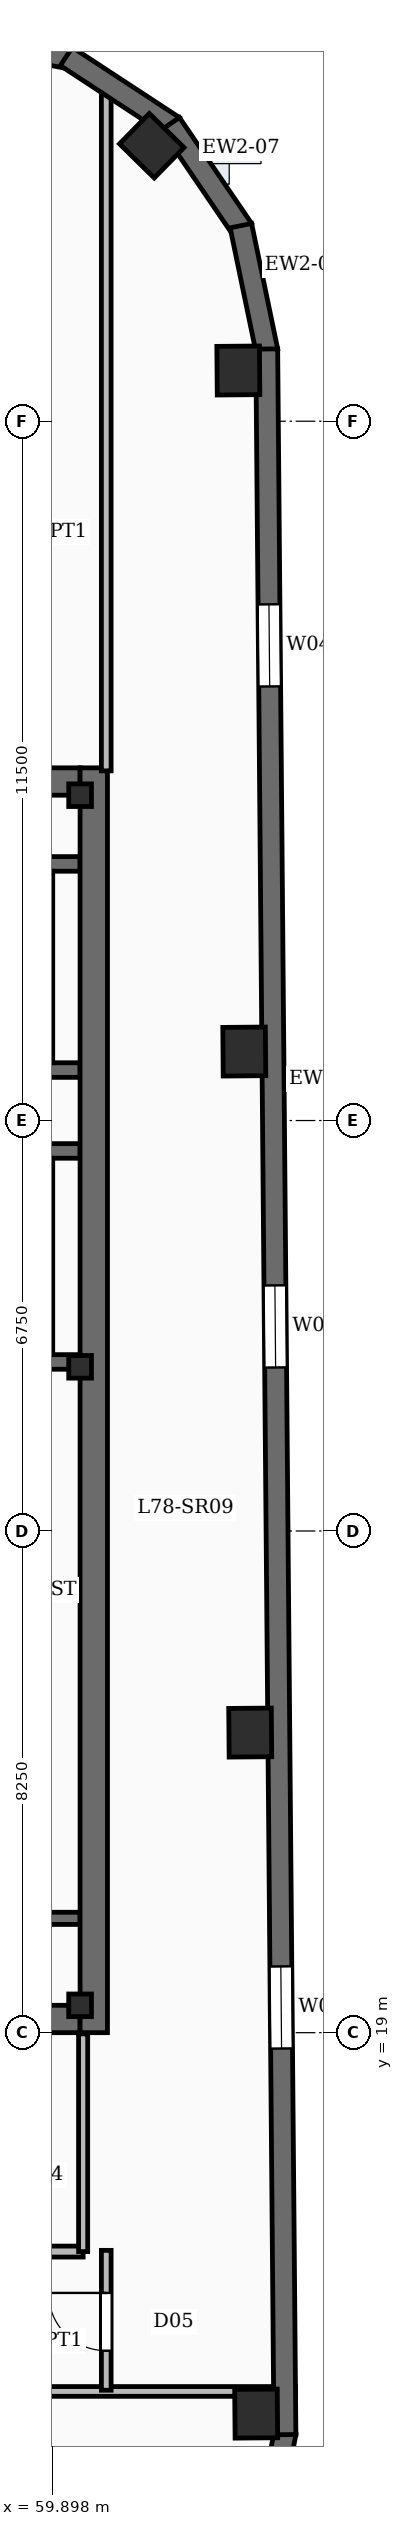
"""IFC4 building model, lengths in metres.
Left out: names, types, materials, properties, quantities, classifications, styles, units other than length and angle.
Written with IfcOpenShell. Run it as: python <this file> out.ifc"""

import sys

from ifc_helpers import new_model, si_unit, direction, frame, frame_2d, origin, origin_2d, place, context, subcontext, project, spatial, rectangle, i_section, extrude, element, fill, save


model = new_model("IFC4")
c1 = context("Model", 3, precision=1e-05, world=origin(), true_north=direction((0.0, 1.0)))
c2 = subcontext(c1, "Body", "Model", "MODEL_VIEW")
j1 = project(units=[si_unit("LENGTHUNIT", "METRE"), si_unit("PLANEANGLEUNIT", "RADIAN")], contexts=[c1])
p1 = place(None, origin())
s1 = spatial("IfcSite", under=j1, at=p1, CompositionType="ELEMENT")
p2 = place(p1, origin())
s2 = spatial("IfcBuilding", under=s1, at=p2, CompositionType="ELEMENT")
p3 = place(p2, frame((0.0, 0.0, 317.2)))
s3 = spatial("IfcBuildingStorey", under=s2, at=p3, CompositionType="ELEMENT", Elevation=317.2)
p4 = place(p3, frame((60.575, 19.0, -0.24), z_axis=(0.0, 0.0, 1.0), x_axis=(0.0, 1.0, 0.0)))
e1 = element("IfcWall", 1, at=p4, inside=s3, PredefinedType="SHEAR", context=c2, shape_type="SweptSolid", body=[
    extrude(rectangle(XDim=20.8, YDim=0.45, at=frame_2d((10.4, 0.0))), origin(), (0.0, 0.0, 1.0), 4.62),
])
for number, where, z_axis, x_axis in (
    (2, (50.55, 19.225, -0.24), (0.0, 0.0, 1.0), (1.0, 0.0, 0.0)),
    (3, (50.55, 39.575, -0.24), (0.0, 0.0, 1.0), (1.0, 0.0, 0.0)),
):
    element("IfcWall", number, at=place(p3, frame(where, z_axis=z_axis, x_axis=x_axis)), inside=s3, PredefinedType="SHEAR", context=c2, shape_type="SweptSolid", body=[
        extrude(rectangle(XDim=9.8, YDim=0.45, at=frame_2d((4.9, 0.0))), origin(), (0.0, 0.0, 1.0), 4.62),
    ])
for number, where, z_axis, x_axis in (
    (4, (60.35, 19.45, -0.24), (0.0, 0.0, 1.0), (1.0, 0.0, 0.0)),
    (5, (60.35, 29.95, -0.24), (0.0, 0.0, 1.0), (1.0, 0.0, 0.0)),
    (6, (60.35, 39.35, -0.24), (0.0, 0.0, 1.0), (1.0, 0.0, 0.0)),
):
    element("IfcColumn", number, at=place(p3, frame(where, z_axis=z_axis, x_axis=x_axis)), inside=s3, PredefinedType="COLUMN", context=c2, shape_type="SweptSolid", body=[
        extrude(i_section(OverallWidth=0.374, OverallDepth=0.372, WebThickness=0.016, FlangeThickness=0.026, FilletRadius=0.02, at=origin_2d()), origin(), (0.0, 0.0, 1.0), 4.62),
    ])
for number, where, z_axis, x_axis in (
    (7, (63.246, 12.735, -0.24), (0.0, 0.0, 1.0), (-0.009, 1.0, 0.0)),
    (8, (63.148, 23.935, -0.24), (0.0, 0.0, 1.0), (-0.009, 1.0, 0.0)),
    (9, (63.05, 35.135, -0.24), (0.0, 0.0, 1.0), (-0.009, 1.0, 0.0)),
    (10, (62.952, 46.334, -0.24), (0.0, 0.0, 1.0), (-0.009, 1.0, 0.0)),
    (11, (61.529, 50.031, -0.24), (0.0, 0.0, 1.0), (-0.713, 0.701, 0.0)),
):
    element("IfcColumn", number, at=place(p3, frame(where, z_axis=z_axis, x_axis=x_axis)), inside=s3, PredefinedType="COLUMN", context=c2, shape_type="SweptSolid", body=[
        extrude(rectangle(XDim=0.8, YDim=0.7, at=origin_2d()), origin(), (0.0, 0.0, 1.0), 4.62),
    ])
p5 = place(p3, frame((63.722, 12.425, 0.0), z_axis=(0.0, 0.0, 1.0), x_axis=(-0.186435855703, -0.98246713518, 0.0)))
e12 = element("IfcWall", 12, at=p5, inside=s3, PredefinedType="SOLIDWALL", context=c2, shape_type="SweptSolid", body=[
    extrude(rectangle(XDim=2.107, YDim=0.36, at=frame_2d((1.053, 0.0))), origin(), (0.0, 0.0, 1.0), 4.38),
])
p6 = place(p3, frame((63.419, 46.688, 0.0), z_axis=(0.0, 0.0, 1.0), x_axis=(0.008726391715, -0.999961924319, 0.0)))
e13 = element("IfcWall", 13, at=p6, inside=s3, PredefinedType="SOLIDWALL", context=c2, shape_type="SweptSolid", body=[
    extrude(rectangle(XDim=34.3, YDim=0.36, at=frame_2d((17.15, 0.0))), origin(), (0.0, 0.0, 1.0), 4.38),
])
p7 = place(p6, frame((4.2, 0.0, 0.88)))
e14 = element("IfcOpeningElement", 14, at=p7, cuts=e13, PredefinedType="OPENING", context=c2, shape_type="SweptSolid", body=[
    extrude(rectangle(XDim=1.35, YDim=2.2, at=frame_2d((0.675, 1.1))), frame((0.0, 0.19, 0.0), z_axis=(0.0, -1.0, 0.0), x_axis=(1.0, 0.0, 0.0)), (0.0, 0.0, 1.0), 0.38),
])
p8 = place(p6, frame((15.4, 0.0, 0.88)))
e15 = element("IfcOpeningElement", 15, at=p8, cuts=e13, PredefinedType="OPENING", context=c2, shape_type="SweptSolid", body=[
    extrude(rectangle(XDim=1.35, YDim=2.2, at=frame_2d((0.675, 1.1))), frame((0.0, 0.19, 0.0), z_axis=(0.0, -1.0, 0.0), x_axis=(1.0, 0.0, 0.0)), (0.0, 0.0, 1.0), 0.38),
])
p9 = place(p6, frame((26.6, 0.0, 0.88)))
e16 = element("IfcOpeningElement", 16, at=p9, cuts=e13, PredefinedType="OPENING", context=c2, shape_type="SweptSolid", body=[
    extrude(rectangle(XDim=1.35, YDim=2.2, at=frame_2d((0.675, 1.1))), frame((0.0, 0.19, 0.0), z_axis=(0.0, -1.0, 0.0), x_axis=(1.0, 0.0, 0.0)), (0.0, 0.0, 1.0), 0.38),
])
for number, where, z_axis, x_axis in (
    (17, (62.994, 48.716, 0.0), (0.0, 0.0, 1.0), (0.204, -0.979, 0.0)),
    (18, (61.836, 50.393, 0.0), (0.0, 0.0, 1.0), (0.563, -0.827, 0.0)),
):
    element("IfcWall", number, at=place(p3, frame(where, z_axis=z_axis, x_axis=x_axis)), inside=s3, PredefinedType="SOLIDWALL", context=c2, shape_type="SweptSolid", body=[
        extrude(rectangle(XDim=2.107, YDim=0.36, at=frame_2d((1.053, 0.0))), origin(), (0.0, 0.0, 1.0), 4.38),
    ])
for number, where, z_axis, x_axis in (
    (19, (60.124, 51.499, 0.0), (0.0, 0.0, 1.0), (0.836, -0.548, 0.0)),
    (20, (58.119, 51.865, 0.0), (0.0, 0.0, 1.0), (0.982, -0.186, 0.0)),
):
    element("IfcWall", number, at=place(p3, frame(where, z_axis=z_axis, x_axis=x_axis)), inside=s3, PredefinedType="SOLIDWALL", context=c2, shape_type="SweptSolid", body=[
        extrude(rectangle(XDim=2.107, YDim=0.36, at=frame_2d((1.053, 0.0))), origin(), (0.0, 0.0, 1.0), 4.38),
    ])
p10 = place(p3, frame((60.35, 30.03, 0.0), z_axis=(0.0, 0.0, 1.0), x_axis=(-1.0, 0.0, 0.0)))
e21 = element("IfcWall", 21, at=p10, inside=s3, PredefinedType="SOLIDWALL", context=c2, shape_type="SweptSolid", body=[
    extrude(rectangle(XDim=9.8, YDim=0.24, at=frame_2d((4.9, 0.0))), origin(), (0.0, 0.0, 1.0), 4.38),
])
p11 = place(p10, frame((7.83, 0.0, 0.0)))
e22 = element("IfcOpeningElement", 22, at=p11, cuts=e21, PredefinedType="OPENING", context=c2, shape_type="SweptSolid", body=[
    extrude(rectangle(XDim=1.1, YDim=2.15, at=frame_2d((0.55, 1.075))), frame((0.0, 0.13, 0.0), z_axis=(0.0, -1.0, 0.0), x_axis=(1.0, 0.0, 0.0)), (0.0, 0.0, 1.0), 0.26),
])
p12 = place(p3, frame((50.55, 33.5, 0.0), z_axis=(0.0, 0.0, 1.0), x_axis=(1.0, 0.0, 0.0)))
e23 = element("IfcWall", 23, at=p12, inside=s3, PredefinedType="SOLIDWALL", context=c2, shape_type="SweptSolid", body=[
    extrude(rectangle(XDim=9.8, YDim=0.24, at=frame_2d((4.9, 0.0))), origin(), (0.0, 0.0, 1.0), 4.38),
])
p13 = place(p3, frame((59.78, 30.15, 0.0), z_axis=(0.0, 0.0, 1.0), x_axis=(0.0, 1.0, 0.0)))
e24 = element("IfcWall", 24, at=p13, inside=s3, PredefinedType="SOLIDWALL", context=c2, shape_type="SweptSolid", body=[
    extrude(rectangle(XDim=3.23, YDim=0.24, at=frame_2d((1.615, 0.0))), origin(), (0.0, 0.0, 1.0), 4.38),
])
p14 = place(p3, frame((60.35, 34.83, 0.0), z_axis=(0.0, 0.0, 1.0), x_axis=(-1.0, 0.0, 0.0)))
e25 = element("IfcWall", 25, at=p14, inside=s3, PredefinedType="SOLIDWALL", context=c2, shape_type="SweptSolid", body=[
    extrude(rectangle(XDim=9.8, YDim=0.24, at=frame_2d((4.9, 0.0))), origin(), (0.0, 0.0, 1.0), 4.38),
])
p15 = place(p14, frame((7.87, 0.0, 0.0)))
e26 = element("IfcOpeningElement", 26, at=p15, cuts=e25, PredefinedType="OPENING", context=c2, shape_type="SweptSolid", body=[
    extrude(rectangle(XDim=1.1, YDim=2.15, at=frame_2d((0.55, 1.075))), frame((0.0, 0.13, 0.0), z_axis=(0.0, -1.0, 0.0), x_axis=(1.0, 0.0, 0.0)), (0.0, 0.0, 1.0), 0.26),
])
p16 = place(p3, frame((50.55, 38.22, 0.0), z_axis=(0.0, 0.0, 1.0), x_axis=(1.0, 0.0, 0.0)))
e27 = element("IfcWall", 27, at=p16, inside=s3, PredefinedType="SOLIDWALL", context=c2, shape_type="SweptSolid", body=[
    extrude(rectangle(XDim=9.8, YDim=0.24, at=frame_2d((4.9, 0.0))), origin(), (0.0, 0.0, 1.0), 4.38),
])
p17 = place(p3, frame((59.78, 34.95, 0.0), z_axis=(0.0, 0.0, 1.0), x_axis=(0.0, 1.0, 0.0)))
e28 = element("IfcWall", 28, at=p17, inside=s3, PredefinedType="SOLIDWALL", context=c2, shape_type="SweptSolid", body=[
    extrude(rectangle(XDim=3.15, YDim=0.24, at=frame_2d((1.575, 0.0))), origin(), (0.0, 0.0, 1.0), 4.38),
])
p18 = place(p3, frame((50.55, 20.88, 0.0), z_axis=(0.0, 0.0, 1.0), x_axis=(1.0, 0.0, 0.0)))
e29 = element("IfcWall", 29, at=p18, inside=s3, PredefinedType="SOLIDWALL", context=c2, shape_type="SweptSolid", body=[
    extrude(rectangle(XDim=9.8, YDim=0.2, at=frame_2d((4.9, 0.0))), origin(), (0.0, 0.0, 1.0), 3.44),
])
p19 = place(p18, frame((1.4, 0.0, 0.0)))
e30 = element("IfcOpeningElement", 30, at=p19, cuts=e29, PredefinedType="OPENING", context=c2, shape_type="SweptSolid", body=[
    extrude(rectangle(XDim=1.05, YDim=2.15, at=frame_2d((0.525, 1.075))), frame((0.0, 0.11, 0.0), z_axis=(0.0, -1.0, 0.0), x_axis=(1.0, 0.0, 0.0)), (0.0, 0.0, 1.0), 0.22),
])
p20 = place(p18, frame((5.5, 0.0, 0.0)))
e31 = element("IfcOpeningElement", 31, at=p20, cuts=e29, PredefinedType="OPENING", context=c2, shape_type="SweptSolid", body=[
    extrude(rectangle(XDim=1.05, YDim=2.15, at=frame_2d((0.525, 1.075))), frame((0.0, 0.11, 0.0), z_axis=(0.0, -1.0, 0.0), x_axis=(1.0, 0.0, 0.0)), (0.0, 0.0, 1.0), 0.22),
])
p21 = place(p3, frame((50.4, 15.4, 0.0), z_axis=(0.0, 0.0, 1.0), x_axis=(1.0, 0.0, 0.0)))
e32 = element("IfcWall", 32, at=p21, inside=s3, PredefinedType="SOLIDWALL", context=c2, shape_type="SweptSolid", body=[
    extrude(rectangle(XDim=10.0, YDim=0.18, at=frame_2d((5.0, 0.0))), origin(), (0.0, 0.0, 1.0), 3.44),
])
p22 = place(p21, frame((1.19, 0.0, 0.0)))
e33 = element("IfcOpeningElement", 33, at=p22, cuts=e32, PredefinedType="OPENING", context=c2, shape_type="SweptSolid", body=[
    extrude(rectangle(XDim=0.92, YDim=2.1, at=frame_2d((0.46, 1.05))), frame((0.0, 0.1, 0.0), z_axis=(0.0, -1.0, 0.0), x_axis=(1.0, 0.0, 0.0)), (0.0, 0.0, 1.0), 0.2),
])
p23 = place(p21, frame((4.54, 0.0, 0.0)))
e34 = element("IfcOpeningElement", 34, at=p23, cuts=e32, PredefinedType="OPENING", context=c2, shape_type="SweptSolid", body=[
    extrude(rectangle(XDim=0.92, YDim=2.1, at=frame_2d((0.46, 1.05))), frame((0.0, 0.1, 0.0), z_axis=(0.0, -1.0, 0.0), x_axis=(1.0, 0.0, 0.0)), (0.0, 0.0, 1.0), 0.2),
])
p24 = place(p21, frame((7.92, 0.0, 0.0)))
e35 = element("IfcOpeningElement", 35, at=p24, cuts=e32, PredefinedType="OPENING", context=c2, shape_type="SweptSolid", body=[
    extrude(rectangle(XDim=0.86, YDim=2.05, at=frame_2d((0.43, 1.025))), frame((0.0, 0.1, 0.0), z_axis=(0.0, -1.0, 0.0), x_axis=(1.0, 0.0, 0.0)), (0.0, 0.0, 1.0), 0.2),
])
p25 = place(p3, frame((60.4, 15.4, 0.0), z_axis=(0.0, 0.0, 1.0), x_axis=(0.0, 1.0, 0.0)))
e36 = element("IfcWall", 36, at=p25, inside=s3, PredefinedType="PARTITIONING", context=c2, shape_type="SweptSolid", body=[
    extrude(rectangle(XDim=3.58, YDim=0.15, at=frame_2d((1.79, 0.0))), origin(), (0.0, 0.0, 1.0), 3.44),
])
p26 = place(p3, frame((8.79, 13.1, 0.0), z_axis=(0.0, 0.0, 1.0), x_axis=(1.0, 0.0, 0.0)))
e37 = element("IfcWall", 37, at=p26, inside=s3, PredefinedType="PARTITIONING", context=c2, shape_type="SweptSolid", body=[
    extrude(rectangle(XDim=55.102, YDim=0.16, at=frame_2d((27.551, 0.0))), origin(), (0.0, 0.0, 1.0), 3.44),
])
p27 = place(p26, frame((16.21, 0.0, 0.0)))
e38 = element("IfcOpeningElement", 38, at=p27, cuts=e37, PredefinedType="OPENING", context=c2, shape_type="SweptSolid", body=[
    extrude(rectangle(XDim=1.6, YDim=2.15, at=frame_2d((0.8, 1.075))), frame((0.0, 0.09, 0.0), z_axis=(0.0, -1.0, 0.0), x_axis=(1.0, 0.0, 0.0)), (0.0, 0.0, 1.0), 0.18),
])
p28 = place(p26, frame((37.21, 0.0, 0.0)))
e39 = element("IfcOpeningElement", 39, at=p28, cuts=e37, PredefinedType="OPENING", context=c2, shape_type="SweptSolid", body=[
    extrude(rectangle(XDim=1.6, YDim=2.15, at=frame_2d((0.8, 1.075))), frame((0.0, 0.09, 0.0), z_axis=(0.0, -1.0, 0.0), x_axis=(1.0, 0.0, 0.0)), (0.0, 0.0, 1.0), 0.18),
])
p29 = place(p3, frame((60.78, 39.75, 0.0), z_axis=(0.0, 0.0, 1.0), x_axis=(0.0, 1.0, 0.0)))
e40 = element("IfcWall", 40, at=p29, inside=s3, PredefinedType="PARTITIONING", context=c2, shape_type="SweptSolid", body=[
    extrude(rectangle(XDim=11.247, YDim=0.16, at=frame_2d((5.624, 0.0))), origin(), (0.0, 0.0, 1.0), 3.44),
])
p30 = place(p3, frame((60.78, 13.12, 0.0), z_axis=(0.0, 0.0, 1.0), x_axis=(0.0, 1.0, 0.0)))
e41 = element("IfcWall", 41, at=p30, inside=s3, PredefinedType="PARTITIONING", context=c2, shape_type="SweptSolid", body=[
    extrude(rectangle(XDim=2.3, YDim=0.16, at=frame_2d((1.15, 0.0))), origin(), (0.0, 0.0, 1.0), 3.44),
])
p31 = place(p30, frame((0.65, 0.0, 0.0)))
e42 = element("IfcOpeningElement", 42, at=p31, cuts=e41, PredefinedType="OPENING", context=c2, shape_type="SweptSolid", body=[
    extrude(rectangle(XDim=0.95, YDim=2.15, at=frame_2d((0.475, 1.075))), frame((0.0, 0.09, 0.0), z_axis=(0.0, -1.0, 0.0), x_axis=(1.0, 0.0, 0.0)), (0.0, 0.0, 1.0), 0.18),
])
p32 = place(p7, origin())
e43 = element("IfcWindow", 43, at=p32, inside=s3, PartitioningType="SINGLE_PANEL", PredefinedType="WINDOW", context=c2, shape_type="SweptSolid", body=[
    extrude(rectangle(XDim=1.35, YDim=2.2, at=frame_2d((0.675, 1.1))), frame((0.0, 0.03, 0.0), z_axis=(0.0, -1.0, 0.0), x_axis=(1.0, 0.0, 0.0)), (0.0, 0.0, 1.0), 0.06),
])
fill(e14, e43)
p33 = place(p8, origin())
e44 = element("IfcWindow", 44, at=p33, inside=s3, PartitioningType="SINGLE_PANEL", PredefinedType="WINDOW", context=c2, shape_type="SweptSolid", body=[
    extrude(rectangle(XDim=1.35, YDim=2.2, at=frame_2d((0.675, 1.1))), frame((0.0, 0.03, 0.0), z_axis=(0.0, -1.0, 0.0), x_axis=(1.0, 0.0, 0.0)), (0.0, 0.0, 1.0), 0.06),
])
fill(e15, e44)
p34 = place(p9, origin())
e45 = element("IfcWindow", 45, at=p34, inside=s3, PartitioningType="SINGLE_PANEL", PredefinedType="WINDOW", context=c2, shape_type="SweptSolid", body=[
    extrude(rectangle(XDim=1.35, YDim=2.2, at=frame_2d((0.675, 1.1))), frame((0.0, 0.03, 0.0), z_axis=(0.0, -1.0, 0.0), x_axis=(1.0, 0.0, 0.0)), (0.0, 0.0, 1.0), 0.06),
])
fill(e16, e45)
p35 = place(p31, origin())
e46 = element("IfcDoor", 46, at=p35, inside=s3, OperationType="SINGLE_SWING_RIGHT", PredefinedType="DOOR", context=c2, shape_type="SweptSolid", body=[
    extrude(rectangle(XDim=0.95, YDim=2.15, at=frame_2d((0.475, 1.075))), frame((0.0, 0.025, 0.0), z_axis=(0.0, -1.0, 0.0), x_axis=(1.0, 0.0, 0.0)), (0.0, 0.0, 1.0), 0.05),
])
fill(e42, e46)
save(model, sys.argv[1])
